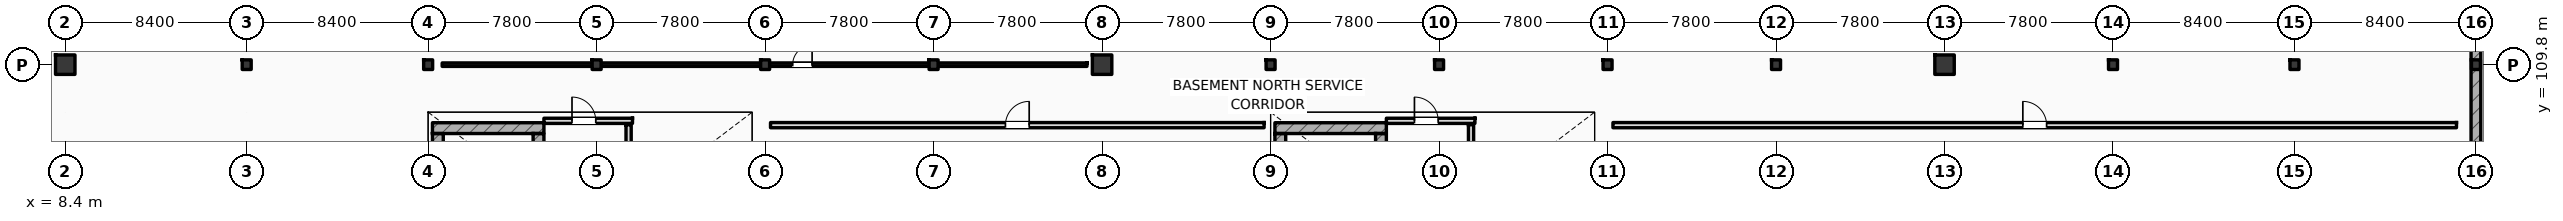
"""IFC4 building model, lengths in metres.
Left out: names, types, materials, properties, quantities, classifications, styles, units other than length and angle.
Written with IfcOpenShell. Run it as: python <this file> out.ifc"""

import sys

from ifc_helpers import new_model, si_unit, direction, frame, frame_2d, origin, origin_2d, place, context, subcontext, project, spatial, rectangle, i_section, extrude, element, fill, save


model = new_model("IFC4")
c1 = context("Model", 3, precision=1e-05, world=origin(), true_north=direction((0.0, 1.0)))
c2 = subcontext(c1, "Body", "Model", "MODEL_VIEW")
j1 = project(units=[si_unit("LENGTHUNIT", "METRE"), si_unit("PLANEANGLEUNIT", "RADIAN")], contexts=[c1])
p1 = place(None, origin())
s1 = spatial("IfcSite", under=j1, at=p1, CompositionType="ELEMENT")
p2 = place(p1, origin())
s2 = spatial("IfcBuilding", under=s1, at=p2, CompositionType="ELEMENT")
p3 = place(p2, frame((0.0, 0.0, -4.5)))
s3 = spatial("IfcBuildingStorey", under=s2, at=p3, CompositionType="ELEMENT", Elevation=-4.5)
p4 = place(p3, frame((120.0, 96.0, 0.0), z_axis=(0.0, 0.0, 1.0), x_axis=(0.0, 1.0, 0.0)))
e1 = element("IfcWall", 1, at=p4, inside=s3, PredefinedType="SOLIDWALL", context=c2, shape_type="SweptSolid", body=[
    extrude(rectangle(XDim=22.0, YDim=0.45, at=frame_2d((11.0, 0.0))), origin(), (0.0, 0.0, 1.0), 4.5),
])
p5 = place(p3, frame((8.037, 112.736, 0.0), z_axis=(0.0, 0.0, 1.0), x_axis=(-0.707106781187, -0.707106781187, 0.0)))
e2 = element("IfcWall", 2, at=p5, inside=s3, PredefinedType="SOLIDWALL", context=c2, shape_type="SweptSolid", body=[
    extrude(rectangle(XDim=3.922, YDim=0.45, at=frame_2d((1.961, 0.0))), origin(), (0.0, 0.0, 1.0), 4.5),
])
p6 = place(p3, frame((8.4, 109.8, 0.0), z_axis=(0.0, 0.0, 1.0), x_axis=(1.0, 0.0, 0.0)))
e3 = element("IfcColumn", 3, at=p6, inside=s3, PredefinedType="COLUMN", context=c2, shape_type="SweptSolid", body=[
    extrude(rectangle(XDim=0.9, YDim=0.9, at=origin_2d()), origin(), (0.0, 0.0, 1.0), 4.5),
])
for number, where, z_axis, x_axis in (
    (4, (16.8, 109.8, 0.0), (0.0, 0.0, 1.0), (1.0, 0.0, 0.0)),
    (5, (25.2, 109.8, 0.0), (0.0, 0.0, 1.0), (1.0, 0.0, 0.0)),
    (6, (33.0, 109.8, 0.0), (0.0, 0.0, 1.0), (1.0, 0.0, 0.0)),
    (7, (40.8, 109.8, 0.0), (0.0, 0.0, 1.0), (1.0, 0.0, 0.0)),
    (8, (48.6, 109.8, 0.0), (0.0, 0.0, 1.0), (1.0, 0.0, 0.0)),
):
    element("IfcColumn", number, at=place(p3, frame(where, z_axis=z_axis, x_axis=x_axis)), inside=s3, PredefinedType="COLUMN", context=c2, shape_type="SweptSolid", body=[
        extrude(i_section(OverallWidth=0.416, OverallDepth=0.446, WebThickness=0.036, FlangeThickness=0.048, FilletRadius=0.015, at=origin_2d()), origin(), (0.0, 0.0, 1.0), 4.5),
    ])
p7 = place(p3, frame((56.4, 109.8, 0.0), z_axis=(0.0, 0.0, 1.0), x_axis=(1.0, 0.0, 0.0)))
e9 = element("IfcColumn", 9, at=p7, inside=s3, PredefinedType="COLUMN", context=c2, shape_type="SweptSolid", body=[
    extrude(rectangle(XDim=0.9, YDim=0.9, at=origin_2d()), origin(), (0.0, 0.0, 1.0), 4.5),
])
for number, where, z_axis, x_axis in (
    (10, (64.2, 109.8, 0.0), (0.0, 0.0, 1.0), (1.0, 0.0, 0.0)),
    (11, (72.0, 109.8, 0.0), (0.0, 0.0, 1.0), (1.0, 0.0, 0.0)),
    (12, (79.8, 109.8, 0.0), (0.0, 0.0, 1.0), (1.0, 0.0, 0.0)),
    (13, (87.6, 109.8, 0.0), (0.0, 0.0, 1.0), (1.0, 0.0, 0.0)),
):
    element("IfcColumn", number, at=place(p3, frame(where, z_axis=z_axis, x_axis=x_axis)), inside=s3, PredefinedType="COLUMN", context=c2, shape_type="SweptSolid", body=[
        extrude(i_section(OverallWidth=0.416, OverallDepth=0.446, WebThickness=0.036, FlangeThickness=0.048, FilletRadius=0.015, at=origin_2d()), origin(), (0.0, 0.0, 1.0), 4.5),
    ])
p8 = place(p3, frame((95.4, 109.8, 0.0), z_axis=(0.0, 0.0, 1.0), x_axis=(1.0, 0.0, 0.0)))
e14 = element("IfcColumn", 14, at=p8, inside=s3, PredefinedType="COLUMN", context=c2, shape_type="SweptSolid", body=[
    extrude(rectangle(XDim=0.9, YDim=0.9, at=origin_2d()), origin(), (0.0, 0.0, 1.0), 4.5),
])
for number, where, z_axis, x_axis in (
    (15, (103.2, 109.8, 0.0), (0.0, 0.0, 1.0), (1.0, 0.0, 0.0)),
    (16, (111.6, 109.8, 0.0), (0.0, 0.0, 1.0), (1.0, 0.0, 0.0)),
    (17, (120.0, 109.8, 0.0), (0.0, 0.0, 1.0), (1.0, 0.0, 0.0)),
):
    element("IfcColumn", number, at=place(p3, frame(where, z_axis=z_axis, x_axis=x_axis)), inside=s3, PredefinedType="COLUMN", context=c2, shape_type="SweptSolid", body=[
        extrude(i_section(OverallWidth=0.416, OverallDepth=0.446, WebThickness=0.036, FlangeThickness=0.048, FilletRadius=0.015, at=origin_2d()), origin(), (0.0, 0.0, 1.0), 4.5),
    ])
p9 = place(p3, frame((25.4, 106.862, 0.0), z_axis=(0.0, 0.0, 1.0), x_axis=(1.0, 0.0, 0.0)))
e18 = element("IfcWall", 18, at=p9, inside=s3, PredefinedType="SHEAR", context=c2, shape_type="SweptSolid", body=[
    extrude(rectangle(XDim=5.16, YDim=0.5, at=frame_2d((2.58, 0.0))), origin(), (0.0, 0.0, 1.0), 4.5),
])
p10 = place(p3, frame((25.65, 97.5, 0.0), z_axis=(0.0, 0.0, 1.0), x_axis=(0.0, 1.0, 0.0)))
e19 = element("IfcWall", 19, at=p10, inside=s3, PredefinedType="SHEAR", context=c2, shape_type="SweptSolid", body=[
    extrude(rectangle(XDim=9.112, YDim=0.5, at=frame_2d((4.556, 0.0))), origin(), (0.0, 0.0, 1.0), 4.5),
])
p11 = place(p3, frame((30.31, 97.5, 0.0), z_axis=(0.0, 0.0, 1.0), x_axis=(0.0, 1.0, 0.0)))
e20 = element("IfcWall", 20, at=p11, inside=s3, PredefinedType="SHEAR", context=c2, shape_type="SweptSolid", body=[
    extrude(rectangle(XDim=9.112, YDim=0.5, at=frame_2d((4.556, 0.0))), origin(), (0.0, 0.0, 1.0), 4.5),
])
p12 = place(p11, frame((0.44, 0.0, 0.0)))
e21 = element("IfcOpeningElement", 21, at=p12, cuts=e20, PredefinedType="OPENING", context=c2, shape_type="SweptSolid", body=[
    extrude(rectangle(XDim=1.1, YDim=2.2, at=frame_2d((0.55, 1.1))), frame((0.0, 0.26, 0.0), z_axis=(0.0, -1.0, 0.0), x_axis=(1.0, 0.0, 0.0)), (0.0, 0.0, 1.0), 0.52),
])
p13 = place(p3, frame((64.4, 106.862, 0.0), z_axis=(0.0, 0.0, 1.0), x_axis=(1.0, 0.0, 0.0)))
e22 = element("IfcWall", 22, at=p13, inside=s3, PredefinedType="SHEAR", context=c2, shape_type="SweptSolid", body=[
    extrude(rectangle(XDim=5.16, YDim=0.5, at=frame_2d((2.58, 0.0))), origin(), (0.0, 0.0, 1.0), 4.5),
])
p14 = place(p3, frame((64.65, 97.5, 0.0), z_axis=(0.0, 0.0, 1.0), x_axis=(0.0, 1.0, 0.0)))
e23 = element("IfcWall", 23, at=p14, inside=s3, PredefinedType="SHEAR", context=c2, shape_type="SweptSolid", body=[
    extrude(rectangle(XDim=9.112, YDim=0.5, at=frame_2d((4.556, 0.0))), origin(), (0.0, 0.0, 1.0), 4.5),
])
p15 = place(p3, frame((69.31, 97.5, 0.0), z_axis=(0.0, 0.0, 1.0), x_axis=(0.0, 1.0, 0.0)))
e24 = element("IfcWall", 24, at=p15, inside=s3, PredefinedType="SHEAR", context=c2, shape_type="SweptSolid", body=[
    extrude(rectangle(XDim=9.112, YDim=0.5, at=frame_2d((4.556, 0.0))), origin(), (0.0, 0.0, 1.0), 4.5),
])
p16 = place(p15, frame((0.44, 0.0, 0.0)))
e25 = element("IfcOpeningElement", 25, at=p16, cuts=e24, PredefinedType="OPENING", context=c2, shape_type="SweptSolid", body=[
    extrude(rectangle(XDim=1.1, YDim=2.2, at=frame_2d((0.55, 1.1))), frame((0.0, 0.26, 0.0), z_axis=(0.0, -1.0, 0.0), x_axis=(1.0, 0.0, 0.0)), (0.0, 0.0, 1.0), 0.52),
])
p17 = place(p3, frame((34.48, 98.78, 0.0), z_axis=(0.0, 0.0, 1.0), x_axis=(0.0, 1.0, 0.0)))
e26 = element("IfcWall", 26, at=p17, inside=s3, PredefinedType="STANDARD", context=c2, shape_type="SweptSolid", body=[
    extrude(rectangle(XDim=8.24, YDim=0.24, at=frame_2d((4.12, 0.0))), origin(), (0.0, 0.0, 1.0), 4.1),
])
p18 = place(p3, frame((30.56, 107.2, 0.0), z_axis=(0.0, 0.0, 1.0), x_axis=(1.0, 0.0, 0.0)))
e27 = element("IfcWall", 27, at=p18, inside=s3, PredefinedType="STANDARD", context=c2, shape_type="SweptSolid", body=[
    extrude(rectangle(XDim=4.1, YDim=0.24, at=frame_2d((2.05, 0.0))), origin(), (0.0, 0.0, 1.0), 4.1),
])
p19 = place(p18, frame((1.3, 0.0, 0.0)))
e28 = element("IfcOpeningElement", 28, at=p19, cuts=e27, PredefinedType="OPENING", context=c2, shape_type="SweptSolid", body=[
    extrude(rectangle(XDim=1.1, YDim=2.2, at=frame_2d((0.55, 1.1))), frame((0.0, 0.13, 0.0), z_axis=(0.0, -1.0, 0.0), x_axis=(1.0, 0.0, 0.0)), (0.0, 0.0, 1.0), 0.26),
])
p20 = place(p3, frame((73.48, 98.78, 0.0), z_axis=(0.0, 0.0, 1.0), x_axis=(0.0, 1.0, 0.0)))
e29 = element("IfcWall", 29, at=p20, inside=s3, PredefinedType="STANDARD", context=c2, shape_type="SweptSolid", body=[
    extrude(rectangle(XDim=8.24, YDim=0.24, at=frame_2d((4.12, 0.0))), origin(), (0.0, 0.0, 1.0), 4.1),
])
p21 = place(p3, frame((69.56, 107.2, 0.0), z_axis=(0.0, 0.0, 1.0), x_axis=(1.0, 0.0, 0.0)))
e30 = element("IfcWall", 30, at=p21, inside=s3, PredefinedType="STANDARD", context=c2, shape_type="SweptSolid", body=[
    extrude(rectangle(XDim=4.1, YDim=0.24, at=frame_2d((2.05, 0.0))), origin(), (0.0, 0.0, 1.0), 4.1),
])
p22 = place(p21, frame((1.3, 0.0, 0.0)))
e31 = element("IfcOpeningElement", 31, at=p22, cuts=e30, PredefinedType="OPENING", context=c2, shape_type="SweptSolid", body=[
    extrude(rectangle(XDim=1.1, YDim=2.2, at=frame_2d((0.55, 1.1))), frame((0.0, 0.13, 0.0), z_axis=(0.0, -1.0, 0.0), x_axis=(1.0, 0.0, 0.0)), (0.0, 0.0, 1.0), 0.26),
])
p23 = place(p3, frame((25.85, 109.8, 0.0), z_axis=(0.0, 0.0, 1.0), x_axis=(1.0, 0.0, 0.0)))
e32 = element("IfcWall", 32, at=p23, inside=s3, PredefinedType="PARTITIONING", context=c2, shape_type="SweptSolid", body=[
    extrude(rectangle(XDim=29.85, YDim=0.16, at=frame_2d((14.925, 0.0))), origin(), (0.0, 0.0, 1.0), 3.59),
])
p24 = place(p23, frame((16.225, 0.0, 0.0)))
e33 = element("IfcOpeningElement", 33, at=p24, cuts=e32, PredefinedType="OPENING", context=c2, shape_type="SweptSolid", body=[
    extrude(rectangle(XDim=0.9, YDim=2.1, at=frame_2d((0.45, 1.05))), frame((0.0, 0.09, 0.0), z_axis=(0.0, -1.0, 0.0), x_axis=(1.0, 0.0, 0.0)), (0.0, 0.0, 1.0), 0.18),
])
p25 = place(p3, frame((41.05, 107.0, 0.0), z_axis=(0.0, 0.0, 1.0), x_axis=(1.0, 0.0, 0.0)))
e34 = element("IfcWall", 34, at=p25, inside=s3, PredefinedType="STANDARD", context=c2, shape_type="SweptSolid", body=[
    extrude(rectangle(XDim=22.85, YDim=0.24, at=frame_2d((11.425, 0.0))), origin(), (0.0, 0.0, 1.0), 4.1),
])
p26 = place(p25, frame((10.875, 0.0, 0.0)))
e35 = element("IfcOpeningElement", 35, at=p26, cuts=e34, PredefinedType="OPENING", context=c2, shape_type="SweptSolid", body=[
    extrude(rectangle(XDim=1.1, YDim=2.2, at=frame_2d((0.55, 1.1))), frame((0.0, 0.13, 0.0), z_axis=(0.0, -1.0, 0.0), x_axis=(1.0, 0.0, 0.0)), (0.0, 0.0, 1.0), 0.26),
])
p27 = place(p3, frame((80.05, 107.0, 0.0), z_axis=(0.0, 0.0, 1.0), x_axis=(1.0, 0.0, 0.0)))
e36 = element("IfcWall", 36, at=p27, inside=s3, PredefinedType="STANDARD", context=c2, shape_type="SweptSolid", body=[
    extrude(rectangle(XDim=39.05, YDim=0.24, at=frame_2d((19.525, 0.0))), origin(), (0.0, 0.0, 1.0), 4.1),
])
p28 = place(p27, frame((18.975, 0.0, 0.0)))
e37 = element("IfcOpeningElement", 37, at=p28, cuts=e36, PredefinedType="OPENING", context=c2, shape_type="SweptSolid", body=[
    extrude(rectangle(XDim=1.1, YDim=2.2, at=frame_2d((0.55, 1.1))), frame((0.0, 0.13, 0.0), z_axis=(0.0, -1.0, 0.0), x_axis=(1.0, 0.0, 0.0)), (0.0, 0.0, 1.0), 0.26),
])
p29 = place(p19, origin())
e38 = element("IfcDoor", 38, at=p29, inside=s3, OperationType="SINGLE_SWING_LEFT", PredefinedType="DOOR", context=c2, shape_type="SweptSolid", body=[
    extrude(rectangle(XDim=1.1, YDim=2.2, at=frame_2d((0.55, 1.1))), frame((0.0, 0.025, 0.0), z_axis=(0.0, -1.0, 0.0), x_axis=(1.0, 0.0, 0.0)), (0.0, 0.0, 1.0), 0.05),
])
fill(e28, e38)
p30 = place(p22, origin())
e39 = element("IfcDoor", 39, at=p30, inside=s3, OperationType="SINGLE_SWING_LEFT", PredefinedType="DOOR", context=c2, shape_type="SweptSolid", body=[
    extrude(rectangle(XDim=1.1, YDim=2.2, at=frame_2d((0.55, 1.1))), frame((0.0, 0.025, 0.0), z_axis=(0.0, -1.0, 0.0), x_axis=(1.0, 0.0, 0.0)), (0.0, 0.0, 1.0), 0.05),
])
fill(e31, e39)
p31 = place(p24, origin())
e40 = element("IfcDoor", 40, at=p31, inside=s3, OperationType="SINGLE_SWING_RIGHT", PredefinedType="DOOR", context=c2, shape_type="SweptSolid", body=[
    extrude(rectangle(XDim=0.9, YDim=2.1, at=frame_2d((0.45, 1.05))), frame((0.0, 0.025, 0.0), z_axis=(0.0, -1.0, 0.0), x_axis=(1.0, 0.0, 0.0)), (0.0, 0.0, 1.0), 0.05),
])
fill(e33, e40)
p32 = place(p26, origin())
e41 = element("IfcDoor", 41, at=p32, inside=s3, OperationType="SINGLE_SWING_RIGHT", PredefinedType="DOOR", context=c2, shape_type="SweptSolid", body=[
    extrude(rectangle(XDim=1.1, YDim=2.2, at=frame_2d((0.55, 1.1))), frame((0.0, 0.025, 0.0), z_axis=(0.0, -1.0, 0.0), x_axis=(1.0, 0.0, 0.0)), (0.0, 0.0, 1.0), 0.05),
])
fill(e35, e41)
p33 = place(p28, origin())
e42 = element("IfcDoor", 42, at=p33, inside=s3, OperationType="SINGLE_SWING_LEFT", PredefinedType="DOOR", context=c2, shape_type="SweptSolid", body=[
    extrude(rectangle(XDim=1.1, YDim=2.2, at=frame_2d((0.55, 1.1))), frame((0.0, 0.025, 0.0), z_axis=(0.0, -1.0, 0.0), x_axis=(1.0, 0.0, 0.0)), (0.0, 0.0, 1.0), 0.05),
])
fill(e37, e42)
save(model, sys.argv[1])
